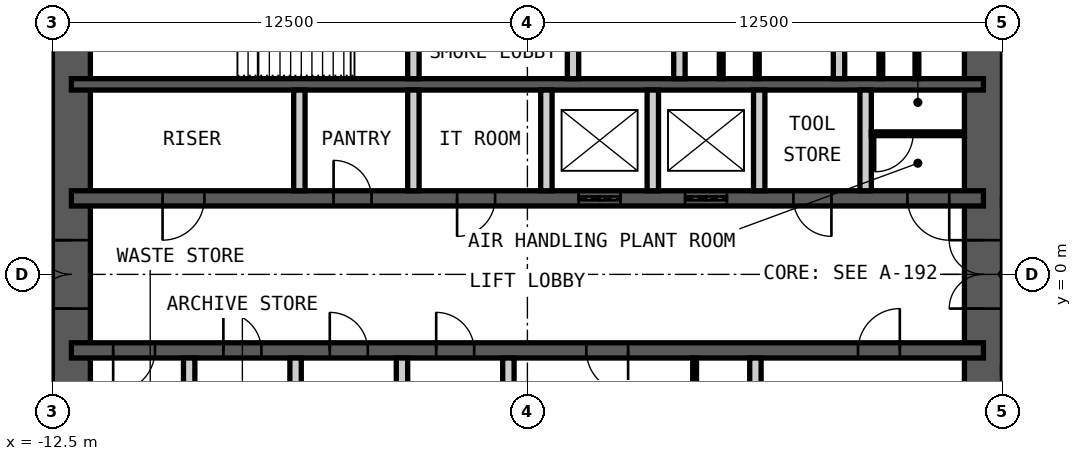
"""IFC4 building model, lengths in metres.
Left out: names, types, materials, properties, quantities, classifications, styles, units other than length and angle.
Written with IfcOpenShell. Run it as: python <this file> out.ifc"""

import sys

from ifc_helpers import new_model, si_unit, direction, frame, frame_2d, origin, place, context, subcontext, project, spatial, rectangle, extrude, element, fill, save


model = new_model("IFC4")
c1 = context("Model", 3, precision=1e-05, world=origin(), true_north=direction((0.0, 1.0)))
c2 = subcontext(c1, "Body", "Model", "MODEL_VIEW")
j1 = project(units=[si_unit("LENGTHUNIT", "METRE"), si_unit("PLANEANGLEUNIT", "RADIAN")], contexts=[c1])
p1 = place(None, origin())
s1 = spatial("IfcSite", under=j1, at=p1, CompositionType="ELEMENT")
p2 = place(p1, origin())
s2 = spatial("IfcBuilding", under=s1, at=p2, CompositionType="ELEMENT")
p3 = place(p2, frame((0.0, 0.0, 299.8)))
s3 = spatial("IfcBuildingStorey", under=s2, at=p3, CompositionType="ELEMENT", Elevation=299.8)
p4 = place(p3, frame((12.0, -9.0, 0.0), z_axis=(0.0, 0.0, 1.0), x_axis=(0.0, 1.0, 0.0)))
e1 = element("IfcWall", 1, at=p4, inside=s3, PredefinedType="SHEAR", context=c2, shape_type="SweptSolid", body=[
    extrude(rectangle(XDim=18.0, YDim=1.0, at=frame_2d((9.0, 0.0))), origin(), (0.0, 0.0, 1.0), 4.2),
])
p5 = place(p4, frame((8.1, 0.0, 0.0)))
e2 = element("IfcOpeningElement", 2, at=p5, cuts=e1, PredefinedType="OPENING", context=c2, shape_type="SweptSolid", body=[
    extrude(rectangle(XDim=1.8, YDim=2.1, at=frame_2d((0.9, 1.05))), frame((0.0, 0.51, 0.0), z_axis=(0.0, -1.0, 0.0), x_axis=(1.0, 0.0, 0.0)), (0.0, 0.0, 1.0), 1.02),
])
p6 = place(p3, frame((-12.0, -9.0, 0.0), z_axis=(0.0, 0.0, 1.0), x_axis=(0.0, 1.0, 0.0)))
e3 = element("IfcWall", 3, at=p6, inside=s3, PredefinedType="SHEAR", context=c2, shape_type="SweptSolid", body=[
    extrude(rectangle(XDim=18.0, YDim=1.0, at=frame_2d((9.0, 0.0))), origin(), (0.0, 0.0, 1.0), 4.2),
])
p7 = place(p6, frame((8.1, 0.0, 0.0)))
e4 = element("IfcOpeningElement", 4, at=p7, cuts=e3, PredefinedType="OPENING", context=c2, shape_type="SweptSolid", body=[
    extrude(rectangle(XDim=1.8, YDim=2.1, at=frame_2d((0.9, 1.05))), frame((0.0, 0.51, 0.0), z_axis=(0.0, -1.0, 0.0), x_axis=(1.0, 0.0, 0.0)), (0.0, 0.0, 1.0), 1.02),
])
p8 = place(p3, frame((-12.0, 5.0, 0.0), z_axis=(0.0, 0.0, 1.0), x_axis=(1.0, 0.0, 0.0)))
e5 = element("IfcWall", 5, at=p8, inside=s3, PredefinedType="SHEAR", context=c2, shape_type="SweptSolid", body=[
    extrude(rectangle(XDim=24.0, YDim=0.3, at=frame_2d((12.0, 0.0))), origin(), (0.0, 0.0, 1.0), 4.2),
])
p9 = place(p3, frame((-12.0, 2.0, 0.0), z_axis=(0.0, 0.0, 1.0), x_axis=(1.0, 0.0, 0.0)))
e6 = element("IfcWall", 6, at=p9, inside=s3, PredefinedType="SHEAR", context=c2, shape_type="SweptSolid", body=[
    extrude(rectangle(XDim=24.0, YDim=0.4, at=frame_2d((12.0, 0.0))), origin(), (0.0, 0.0, 1.0), 4.2),
])
p10 = place(p9, frame((2.4, 0.0, 0.0)))
e7 = element("IfcOpeningElement", 7, at=p10, cuts=e6, PredefinedType="OPENING", context=c2, shape_type="SweptSolid", body=[
    extrude(rectangle(XDim=1.1, YDim=2.1, at=frame_2d((0.55, 1.05))), frame((0.0, 0.21, 0.0), z_axis=(0.0, -1.0, 0.0), x_axis=(1.0, 0.0, 0.0)), (0.0, 0.0, 1.0), 0.42),
])
p11 = place(p9, frame((22.0, 0.0, 0.0)))
e8 = element("IfcOpeningElement", 8, at=p11, cuts=e6, PredefinedType="OPENING", context=c2, shape_type="SweptSolid", body=[
    extrude(rectangle(XDim=1.1, YDim=2.1, at=frame_2d((0.55, 1.05))), frame((0.0, 0.21, 0.0), z_axis=(0.0, -1.0, 0.0), x_axis=(1.0, 0.0, 0.0)), (0.0, 0.0, 1.0), 0.42),
])
p12 = place(p9, frame((10.15, 0.0, 0.0)))
e9 = element("IfcOpeningElement", 9, at=p12, cuts=e6, PredefinedType="OPENING", context=c2, shape_type="SweptSolid", body=[
    extrude(rectangle(XDim=1.0, YDim=2.1, at=frame_2d((0.5, 1.05))), frame((0.0, 0.21, 0.0), z_axis=(0.0, -1.0, 0.0), x_axis=(1.0, 0.0, 0.0)), (0.0, 0.0, 1.0), 0.42),
])
p13 = place(p9, frame((6.9, 0.0, 0.0)))
e10 = element("IfcOpeningElement", 10, at=p13, cuts=e6, PredefinedType="OPENING", context=c2, shape_type="SweptSolid", body=[
    extrude(rectangle(XDim=1.0, YDim=2.1, at=frame_2d((0.5, 1.05))), frame((0.0, 0.21, 0.0), z_axis=(0.0, -1.0, 0.0), x_axis=(1.0, 0.0, 0.0)), (0.0, 0.0, 1.0), 0.42),
])
p14 = place(p9, frame((13.35, 0.0, 0.0)))
e11 = element("IfcOpeningElement", 11, at=p14, cuts=e6, PredefinedType="OPENING", context=c2, shape_type="SweptSolid", body=[
    extrude(rectangle(XDim=1.1, YDim=2.4, at=frame_2d((0.55, 1.2))), frame((0.0, 0.21, 0.0), z_axis=(0.0, -1.0, 0.0), x_axis=(1.0, 0.0, 0.0)), (0.0, 0.0, 1.0), 0.42),
])
p15 = place(p9, frame((16.15, 0.0, 0.0)))
e12 = element("IfcOpeningElement", 12, at=p15, cuts=e6, PredefinedType="OPENING", context=c2, shape_type="SweptSolid", body=[
    extrude(rectangle(XDim=1.1, YDim=2.4, at=frame_2d((0.55, 1.2))), frame((0.0, 0.21, 0.0), z_axis=(0.0, -1.0, 0.0), x_axis=(1.0, 0.0, 0.0)), (0.0, 0.0, 1.0), 0.42),
])
p16 = place(p9, frame((19.0, 0.0, 0.0)))
e13 = element("IfcOpeningElement", 13, at=p16, cuts=e6, PredefinedType="OPENING", context=c2, shape_type="SweptSolid", body=[
    extrude(rectangle(XDim=1.0, YDim=2.1, at=frame_2d((0.5, 1.05))), frame((0.0, 0.21, 0.0), z_axis=(0.0, -1.0, 0.0), x_axis=(1.0, 0.0, 0.0)), (0.0, 0.0, 1.0), 0.42),
])
p17 = place(p3, frame((-12.0, -2.0, 0.0), z_axis=(0.0, 0.0, 1.0), x_axis=(1.0, 0.0, 0.0)))
e14 = element("IfcWall", 14, at=p17, inside=s3, PredefinedType="SHEAR", context=c2, shape_type="SweptSolid", body=[
    extrude(rectangle(XDim=24.0, YDim=0.4, at=frame_2d((12.0, 0.0))), origin(), (0.0, 0.0, 1.0), 4.2),
])
p18 = place(p17, frame((1.1, 0.0, 0.0)))
e15 = element("IfcOpeningElement", 15, at=p18, cuts=e14, PredefinedType="OPENING", context=c2, shape_type="SweptSolid", body=[
    extrude(rectangle(XDim=1.1, YDim=2.1, at=frame_2d((0.55, 1.05))), frame((0.0, 0.21, 0.0), z_axis=(0.0, -1.0, 0.0), x_axis=(1.0, 0.0, 0.0)), (0.0, 0.0, 1.0), 0.42),
])
p19 = place(p17, frame((13.55, 0.0, 0.0)))
e16 = element("IfcOpeningElement", 16, at=p19, cuts=e14, PredefinedType="OPENING", context=c2, shape_type="SweptSolid", body=[
    extrude(rectangle(XDim=1.1, YDim=2.1, at=frame_2d((0.55, 1.05))), frame((0.0, 0.21, 0.0), z_axis=(0.0, -1.0, 0.0), x_axis=(1.0, 0.0, 0.0)), (0.0, 0.0, 1.0), 0.42),
])
p20 = place(p17, frame((20.7, 0.0, 0.0)))
e17 = element("IfcOpeningElement", 17, at=p20, cuts=e14, PredefinedType="OPENING", context=c2, shape_type="SweptSolid", body=[
    extrude(rectangle(XDim=1.1, YDim=2.1, at=frame_2d((0.55, 1.05))), frame((0.0, 0.21, 0.0), z_axis=(0.0, -1.0, 0.0), x_axis=(1.0, 0.0, 0.0)), (0.0, 0.0, 1.0), 0.42),
])
p21 = place(p17, frame((4.0, 0.0, 0.0)))
e18 = element("IfcOpeningElement", 18, at=p21, cuts=e14, PredefinedType="OPENING", context=c2, shape_type="SweptSolid", body=[
    extrude(rectangle(XDim=1.0, YDim=2.1, at=frame_2d((0.5, 1.05))), frame((0.0, 0.21, 0.0), z_axis=(0.0, -1.0, 0.0), x_axis=(1.0, 0.0, 0.0)), (0.0, 0.0, 1.0), 0.42),
])
p22 = place(p17, frame((6.8, 0.0, 0.0)))
e19 = element("IfcOpeningElement", 19, at=p22, cuts=e14, PredefinedType="OPENING", context=c2, shape_type="SweptSolid", body=[
    extrude(rectangle(XDim=1.0, YDim=2.1, at=frame_2d((0.5, 1.05))), frame((0.0, 0.21, 0.0), z_axis=(0.0, -1.0, 0.0), x_axis=(1.0, 0.0, 0.0)), (0.0, 0.0, 1.0), 0.42),
])
p23 = place(p17, frame((9.6, 0.0, 0.0)))
e20 = element("IfcOpeningElement", 20, at=p23, cuts=e14, PredefinedType="OPENING", context=c2, shape_type="SweptSolid", body=[
    extrude(rectangle(XDim=1.0, YDim=2.1, at=frame_2d((0.5, 1.05))), frame((0.0, 0.21, 0.0), z_axis=(0.0, -1.0, 0.0), x_axis=(1.0, 0.0, 0.0)), (0.0, 0.0, 1.0), 0.42),
])
p24 = place(p3, frame((-3.0, 5.15, 0.0), z_axis=(0.0, 0.0, 1.0), x_axis=(0.0, 1.0, 0.0)))
e21 = element("IfcWall", 21, at=p24, inside=s3, PredefinedType="PARTITIONING", context=c2, shape_type="SweptSolid", body=[
    extrude(rectangle(XDim=3.85, YDim=0.3, at=frame_2d((1.925, 0.0))), origin(), (0.0, 0.0, 1.0), 3.98),
])
p25 = place(p24, frame((1.425, 0.0, 0.0)))
e22 = element("IfcOpeningElement", 22, at=p25, cuts=e21, PredefinedType="OPENING", context=c2, shape_type="SweptSolid", body=[
    extrude(rectangle(XDim=1.0, YDim=2.1, at=frame_2d((0.5, 1.05))), frame((0.0, 0.16, 0.0), z_axis=(0.0, -1.0, 0.0), x_axis=(1.0, 0.0, 0.0)), (0.0, 0.0, 1.0), 0.32),
])
p26 = place(p3, frame((1.2, 5.15, 0.0), z_axis=(0.0, 0.0, 1.0), x_axis=(0.0, 1.0, 0.0)))
e23 = element("IfcWall", 23, at=p26, inside=s3, PredefinedType="PARTITIONING", context=c2, shape_type="SweptSolid", body=[
    extrude(rectangle(XDim=3.85, YDim=0.3, at=frame_2d((1.925, 0.0))), origin(), (0.0, 0.0, 1.0), 3.98),
])
p27 = place(p26, frame((1.375, 0.0, 0.0)))
e24 = element("IfcOpeningElement", 24, at=p27, cuts=e23, PredefinedType="OPENING", context=c2, shape_type="SweptSolid", body=[
    extrude(rectangle(XDim=1.1, YDim=2.4, at=frame_2d((0.55, 1.2))), frame((0.0, 0.16, 0.0), z_axis=(0.0, -1.0, 0.0), x_axis=(1.0, 0.0, 0.0)), (0.0, 0.0, 1.0), 0.32),
])
for number, where, z_axis, x_axis in (
    (25, (4.0, 5.15, 0.0), (0.0, 0.0, 1.0), (0.0, 1.0, 0.0)),
    (26, (8.2, 5.15, 0.0), (0.0, 0.0, 1.0), (0.0, 1.0, 0.0)),
):
    element("IfcWall", number, at=place(p3, frame(where, z_axis=z_axis, x_axis=x_axis)), inside=s3, PredefinedType="PARTITIONING", context=c2, shape_type="SweptSolid", body=[
        extrude(rectangle(XDim=3.85, YDim=0.3, at=frame_2d((1.925, 0.0))), origin(), (0.0, 0.0, 1.0), 3.98),
    ])
for number, where, z_axis, x_axis in (
    (27, (-6.0, 2.2, 0.0), (0.0, 0.0, 1.0), (0.0, 1.0, 0.0)),
    (28, (-3.0, 2.2, 0.0), (0.0, 0.0, 1.0), (0.0, 1.0, 0.0)),
    (29, (0.5, 2.2, 0.0), (0.0, 0.0, 1.0), (0.0, 1.0, 0.0)),
    (30, (3.3, 2.2, 0.0), (0.0, 0.0, 1.0), (0.0, 1.0, 0.0)),
    (31, (6.1, 2.2, 0.0), (0.0, 0.0, 1.0), (0.0, 1.0, 0.0)),
    (32, (8.9, 2.2, 0.0), (0.0, 0.0, 1.0), (0.0, 1.0, 0.0)),
    (33, (-8.9, -4.85, 0.0), (0.0, 0.0, 1.0), (0.0, 1.0, 0.0)),
    (34, (-6.1, -4.85, 0.0), (0.0, 0.0, 1.0), (0.0, 1.0, 0.0)),
    (35, (-3.3, -4.85, 0.0), (0.0, 0.0, 1.0), (0.0, 1.0, 0.0)),
    (36, (-0.5, -4.85, 0.0), (0.0, 0.0, 1.0), (0.0, 1.0, 0.0)),
    (37, (6.0, -4.85, 0.0), (0.0, 0.0, 1.0), (0.0, 1.0, 0.0)),
):
    element("IfcWall", number, at=place(p3, frame(where, z_axis=z_axis, x_axis=x_axis)), inside=s3, PredefinedType="PARTITIONING", context=c2, shape_type="SweptSolid", body=[
        extrude(rectangle(XDim=2.65, YDim=0.3, at=frame_2d((1.325, 0.0))), origin(), (0.0, 0.0, 1.0), 3.98),
    ])
p28 = place(p3, frame((4.4, -4.85, 0.0), z_axis=(0.0, 0.0, 1.0), x_axis=(0.0, 1.0, 0.0)))
e38 = element("IfcWall", 38, at=p28, inside=s3, PredefinedType="PARTITIONING", context=c2, shape_type="SweptSolid", body=[
    extrude(rectangle(XDim=2.65, YDim=0.1, at=frame_2d((1.325, 0.0))), origin(), (0.0, 0.0, 1.0), 3.98),
])
p29 = place(p28, frame((0.1, 0.0, 0.0)))
e39 = element("IfcOpeningElement", 39, at=p29, cuts=e38, PredefinedType="OPENING", context=c2, shape_type="SweptSolid", body=[
    extrude(rectangle(XDim=1.0, YDim=2.4, at=frame_2d((0.5, 1.2))), frame((0.0, 0.06, 0.0), z_axis=(0.0, -1.0, 0.0), x_axis=(1.0, 0.0, 0.0)), (0.0, 0.0, 1.0), 0.12),
])
p30 = place(p3, frame((9.05, 3.7, 0.0), z_axis=(0.0, 0.0, 1.0), x_axis=(1.0, 0.0, 0.0)))
e40 = element("IfcWall", 40, at=p30, inside=s3, PredefinedType="PARTITIONING", context=c2, shape_type="SweptSolid", body=[
    extrude(rectangle(XDim=2.45, YDim=0.1, at=frame_2d((1.225, 0.0))), origin(), (0.0, 0.0, 1.0), 3.98),
])
p31 = place(p30, frame((0.1, 0.0, 0.0)))
e41 = element("IfcOpeningElement", 41, at=p31, cuts=e40, PredefinedType="OPENING", context=c2, shape_type="SweptSolid", body=[
    extrude(rectangle(XDim=1.0, YDim=2.4, at=frame_2d((0.5, 1.2))), frame((0.0, 0.06, 0.0), z_axis=(0.0, -1.0, 0.0), x_axis=(1.0, 0.0, 0.0)), (0.0, 0.0, 1.0), 0.12),
])
for number, where, z_axis, x_axis in (
    (42, (5.1, 5.15, 0.0), (0.0, 0.0, 1.0), (0.0, 1.0, 0.0)),
    (43, (6.05, 5.15, 0.0), (0.0, 0.0, 1.0), (0.0, 1.0, 0.0)),
    (44, (9.3, 5.15, 0.0), (0.0, 0.0, 1.0), (0.0, 1.0, 0.0)),
    (45, (10.25, 5.15, 0.0), (0.0, 0.0, 1.0), (0.0, 1.0, 0.0)),
):
    element("IfcWall", number, at=place(p3, frame(where, z_axis=z_axis, x_axis=x_axis)), inside=s3, PredefinedType="PARTITIONING", context=c2, shape_type="SweptSolid", body=[
        extrude(rectangle(XDim=1.5, YDim=0.1, at=frame_2d((0.75, 0.0))), origin(), (0.0, 0.0, 1.0), 2.1),
    ])
p32 = place(p10, origin())
e46 = element("IfcDoor", 46, at=p32, inside=s3, OperationType="SINGLE_SWING_LEFT", PredefinedType="DOOR", context=c2, shape_type="SweptSolid", body=[
    extrude(rectangle(XDim=1.1, YDim=2.1, at=frame_2d((0.55, 1.05))), frame((0.0, 0.025, 0.0), z_axis=(0.0, -1.0, 0.0), x_axis=(1.0, 0.0, 0.0)), (0.0, 0.0, 1.0), 0.05),
])
fill(e7, e46)
p33 = place(p18, origin())
e47 = element("IfcDoor", 47, at=p33, inside=s3, OperationType="SINGLE_SWING_LEFT", PredefinedType="DOOR", context=c2, shape_type="SweptSolid", body=[
    extrude(rectangle(XDim=1.1, YDim=2.1, at=frame_2d((0.55, 1.05))), frame((0.0, 0.025, 0.0), z_axis=(0.0, -1.0, 0.0), x_axis=(1.0, 0.0, 0.0)), (0.0, 0.0, 1.0), 0.05),
])
fill(e15, e47)
p34 = place(p11, origin())
e48 = element("IfcDoor", 48, at=p34, inside=s3, OperationType="SINGLE_SWING_RIGHT", PredefinedType="DOOR", context=c2, shape_type="SweptSolid", body=[
    extrude(rectangle(XDim=1.1, YDim=2.1, at=frame_2d((0.55, 1.05))), frame((0.0, 0.025, 0.0), z_axis=(0.0, -1.0, 0.0), x_axis=(1.0, 0.0, 0.0)), (0.0, 0.0, 1.0), 0.05),
])
fill(e8, e48)
p35 = place(p12, origin())
e49 = element("IfcDoor", 49, at=p35, inside=s3, OperationType="SINGLE_SWING_LEFT", PredefinedType="DOOR", context=c2, shape_type="SweptSolid", body=[
    extrude(rectangle(XDim=1.0, YDim=2.1, at=frame_2d((0.5, 1.05))), frame((0.0, 0.025, 0.0), z_axis=(0.0, -1.0, 0.0), x_axis=(1.0, 0.0, 0.0)), (0.0, 0.0, 1.0), 0.05),
])
fill(e9, e49)
p36 = place(p19, origin())
e50 = element("IfcDoor", 50, at=p36, inside=s3, OperationType="SINGLE_SWING_RIGHT", PredefinedType="DOOR", context=c2, shape_type="SweptSolid", body=[
    extrude(rectangle(XDim=1.1, YDim=2.1, at=frame_2d((0.55, 1.05))), frame((0.0, 0.025, 0.0), z_axis=(0.0, -1.0, 0.0), x_axis=(1.0, 0.0, 0.0)), (0.0, 0.0, 1.0), 0.05),
])
fill(e16, e50)
p37 = place(p20, origin())
e51 = element("IfcDoor", 51, at=p37, inside=s3, OperationType="SINGLE_SWING_LEFT", PredefinedType="DOOR", context=c2, shape_type="SweptSolid", body=[
    extrude(rectangle(XDim=1.1, YDim=2.1, at=frame_2d((0.55, 1.05))), frame((0.0, 0.025, 0.0), z_axis=(0.0, -1.0, 0.0), x_axis=(1.0, 0.0, 0.0)), (0.0, 0.0, 1.0), 0.05),
])
fill(e17, e51)
p38 = place(p5, origin())
e52 = element("IfcDoor", 52, at=p38, inside=s3, OperationType="DOUBLE_DOOR_DOUBLE_SWING", PredefinedType="DOOR", context=c2, shape_type="SweptSolid", body=[
    extrude(rectangle(XDim=1.8, YDim=2.1, at=frame_2d((0.9, 1.05))), frame((0.0, 0.025, 0.0), z_axis=(0.0, -1.0, 0.0), x_axis=(1.0, 0.0, 0.0)), (0.0, 0.0, 1.0), 0.05),
])
fill(e2, e52)
p39 = place(p7, origin())
e53 = element("IfcDoor", 53, at=p39, inside=s3, OperationType="DOUBLE_DOOR_DOUBLE_SWING", PredefinedType="DOOR", context=c2, shape_type="SweptSolid", body=[
    extrude(rectangle(XDim=1.8, YDim=2.1, at=frame_2d((0.9, 1.05))), frame((0.0, 0.025, 0.0), z_axis=(0.0, -1.0, 0.0), x_axis=(1.0, 0.0, 0.0)), (0.0, 0.0, 1.0), 0.05),
])
fill(e4, e53)
p40 = place(p13, origin())
e54 = element("IfcDoor", 54, at=p40, inside=s3, OperationType="SINGLE_SWING_RIGHT", PredefinedType="DOOR", context=c2, shape_type="SweptSolid", body=[
    extrude(rectangle(XDim=1.0, YDim=2.1, at=frame_2d((0.5, 1.05))), frame((0.0, 0.025, 0.0), z_axis=(0.0, -1.0, 0.0), x_axis=(1.0, 0.0, 0.0)), (0.0, 0.0, 1.0), 0.05),
])
fill(e10, e54)
p41 = place(p14, origin())
e55 = element("IfcDoor", 55, at=p41, inside=s3, OperationType="DOUBLE_DOOR_SLIDING", PredefinedType="DOOR", context=c2, shape_type="SweptSolid", body=[
    extrude(rectangle(XDim=1.1, YDim=2.4, at=frame_2d((0.55, 1.2))), frame((0.0, 0.025, 0.0), z_axis=(0.0, -1.0, 0.0), x_axis=(1.0, 0.0, 0.0)), (0.0, 0.0, 1.0), 0.05),
])
fill(e11, e55)
p42 = place(p15, origin())
e56 = element("IfcDoor", 56, at=p42, inside=s3, OperationType="DOUBLE_DOOR_SLIDING", PredefinedType="DOOR", context=c2, shape_type="SweptSolid", body=[
    extrude(rectangle(XDim=1.1, YDim=2.4, at=frame_2d((0.55, 1.2))), frame((0.0, 0.025, 0.0), z_axis=(0.0, -1.0, 0.0), x_axis=(1.0, 0.0, 0.0)), (0.0, 0.0, 1.0), 0.05),
])
fill(e12, e56)
p43 = place(p16, origin())
e57 = element("IfcDoor", 57, at=p43, inside=s3, OperationType="SINGLE_SWING_RIGHT", PredefinedType="DOOR", context=c2, shape_type="SweptSolid", body=[
    extrude(rectangle(XDim=1.0, YDim=2.1, at=frame_2d((0.5, 1.05))), frame((0.0, 0.025, 0.0), z_axis=(0.0, -1.0, 0.0), x_axis=(1.0, 0.0, 0.0)), (0.0, 0.0, 1.0), 0.05),
])
fill(e13, e57)
p44 = place(p21, origin())
e58 = element("IfcDoor", 58, at=p44, inside=s3, OperationType="SINGLE_SWING_RIGHT", PredefinedType="DOOR", context=c2, shape_type="SweptSolid", body=[
    extrude(rectangle(XDim=1.0, YDim=2.1, at=frame_2d((0.5, 1.05))), frame((0.0, 0.025, 0.0), z_axis=(0.0, -1.0, 0.0), x_axis=(1.0, 0.0, 0.0)), (0.0, 0.0, 1.0), 0.05),
])
fill(e18, e58)
p45 = place(p22, origin())
e59 = element("IfcDoor", 59, at=p45, inside=s3, OperationType="SINGLE_SWING_RIGHT", PredefinedType="DOOR", context=c2, shape_type="SweptSolid", body=[
    extrude(rectangle(XDim=1.0, YDim=2.1, at=frame_2d((0.5, 1.05))), frame((0.0, 0.025, 0.0), z_axis=(0.0, -1.0, 0.0), x_axis=(1.0, 0.0, 0.0)), (0.0, 0.0, 1.0), 0.05),
])
fill(e19, e59)
p46 = place(p23, origin())
e60 = element("IfcDoor", 60, at=p46, inside=s3, OperationType="SINGLE_SWING_RIGHT", PredefinedType="DOOR", context=c2, shape_type="SweptSolid", body=[
    extrude(rectangle(XDim=1.0, YDim=2.1, at=frame_2d((0.5, 1.05))), frame((0.0, 0.025, 0.0), z_axis=(0.0, -1.0, 0.0), x_axis=(1.0, 0.0, 0.0)), (0.0, 0.0, 1.0), 0.05),
])
fill(e20, e60)
p47 = place(p31, origin())
e61 = element("IfcDoor", 61, at=p47, inside=s3, OperationType="SINGLE_SWING_LEFT", PredefinedType="DOOR", context=c2, shape_type="SweptSolid", body=[
    extrude(rectangle(XDim=1.0, YDim=2.4, at=frame_2d((0.5, 1.2))), frame((0.0, 0.025, 0.0), z_axis=(0.0, -1.0, 0.0), x_axis=(1.0, 0.0, 0.0)), (0.0, 0.0, 1.0), 0.05),
])
fill(e41, e61)
save(model, sys.argv[1])
